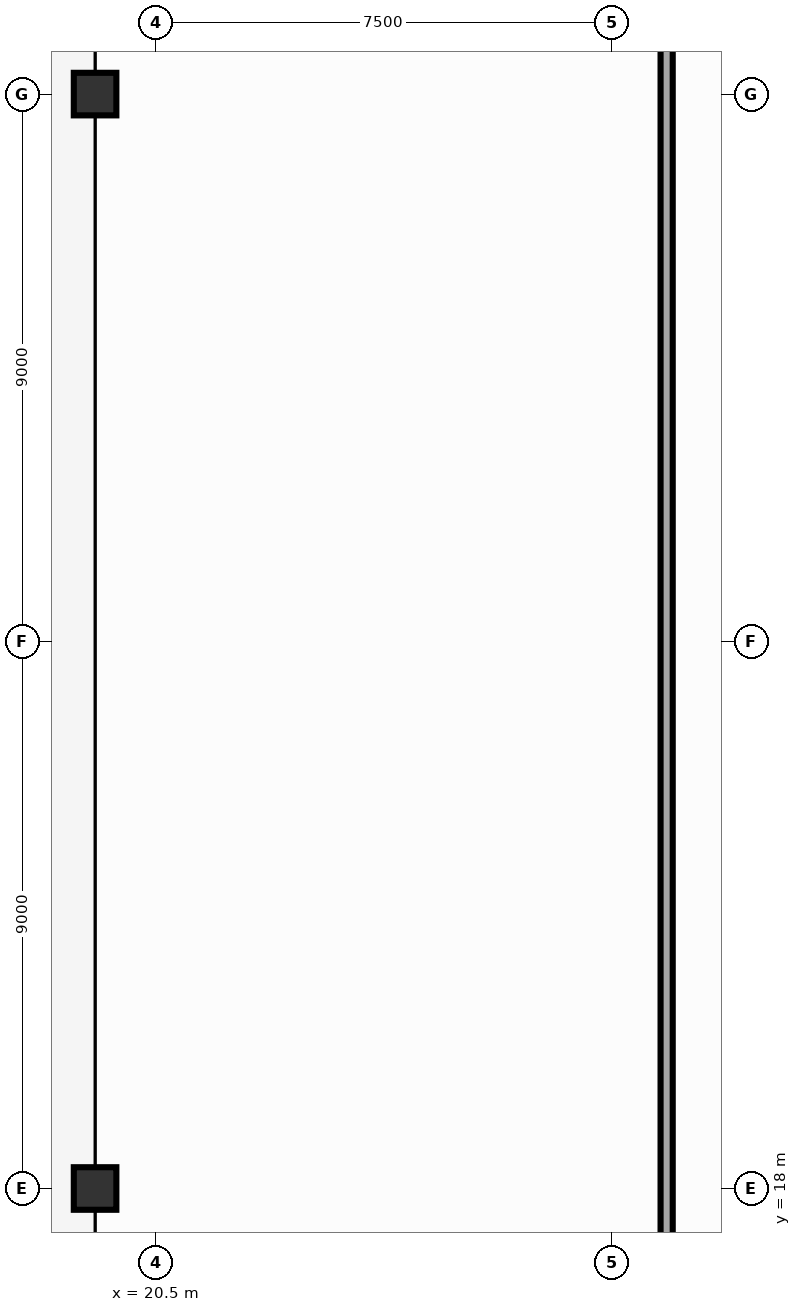
"""IFC4 building model, lengths in metres.
Left out: names, types, materials, properties, quantities, classifications, styles, units other than length and angle.
Written with IfcOpenShell. Run it as: python <this file> out.ifc"""

import sys

from ifc_helpers import new_model, si_unit, direction, frame, frame_2d, origin, origin_2d, place, context, subcontext, project, spatial, rectangle, extrude, source, transform, mapped, element, fill, save


model = new_model("IFC4")
c1 = context("Model", 3, precision=1e-05, world=origin(), true_north=direction((0.0, 1.0)))
c2 = subcontext(c1, "Body", "Model", "MODEL_VIEW")
j1 = project(units=[si_unit("LENGTHUNIT", "METRE"), si_unit("PLANEANGLEUNIT", "RADIAN")], contexts=[c1])
p1 = place(None, origin())
s1 = spatial("IfcSite", under=j1, at=p1, CompositionType="ELEMENT")
p2 = place(p1, origin())
s2 = spatial("IfcBuilding", under=s1, at=p2, CompositionType="ELEMENT")
p3 = place(p2, frame((0.0, 0.0, 206.5)))
s3 = spatial("IfcBuildingStorey", under=s2, at=p3, CompositionType="ELEMENT", Elevation=206.5)
m1 = source(origin(), c2, "Body", "SweptSolid", [
    extrude(rectangle(XDim=0.7, YDim=0.7, at=origin_2d()), origin(), (0.0, 0.0, 1.0), 3.8),
])
for number, where, z_axis, x_axis in (
    (1, (19.5, 36.0, 0.0), (0.0, 0.0, 1.0), (1.0, 0.0, 0.0)),
    (2, (19.5, 18.0, 0.0), (0.0, 0.0, 1.0), (1.0, 0.0, 0.0)),
):
    element("IfcColumn", number, at=place(p3, frame(where, z_axis=z_axis, x_axis=x_axis)), inside=s3, PredefinedType="COLUMN", context=c2, shape_type="MappedRepresentation", body=[
        mapped(m1, transform((0.0, 0.0, 0.0), scale=1.0)),
    ])
p4 = place(p3, frame((28.9, 14.5, 0.0), z_axis=(0.0, 0.0, 1.0), x_axis=(0.0, 1.0, 0.0)))
e3 = element("IfcWall", 3, at=p4, inside=s3, PredefinedType="PARTITIONING", context=c2, shape_type="SweptSolid", body=[
    extrude(rectangle(XDim=24.8, YDim=0.2, at=frame_2d((12.4, 0.0))), origin(), (0.0, 0.0, 1.0), 3.59),
])
p5 = place(p4, frame((11.85, 0.0, 0.0)))
e4 = element("IfcOpeningElement", 4, at=p5, cuts=e3, PredefinedType="OPENING", context=c2, shape_type="SweptSolid", body=[
    extrude(rectangle(XDim=1.1, YDim=2.15, at=frame_2d((0.55, 1.075))), frame((0.0, 0.112, 0.0), z_axis=(0.0, -1.0, 0.0), x_axis=(1.0, 0.0, 0.0)), (0.0, 0.0, 1.0), 0.224),
])
m2 = source(origin(), c2, "Body", "SweptSolid", [
    extrude(rectangle(XDim=1.1, YDim=2.15, at=frame_2d((0.55, 1.075))), frame((0.0, 0.025, 0.0), z_axis=(0.0, -1.0, 0.0), x_axis=(1.0, 0.0, 0.0)), (0.0, 0.0, 1.0), 0.05),
])
p6 = place(p5, origin())
e5 = element("IfcDoor", 5, at=p6, inside=s3, OperationType="SINGLE_SWING_RIGHT", PredefinedType="DOOR", context=c2, shape_type="MappedRepresentation", body=[
    mapped(m2, transform((0.0, 0.0, 0.0), scale=1.0)),
])
fill(e4, e5)
save(model, sys.argv[1])
